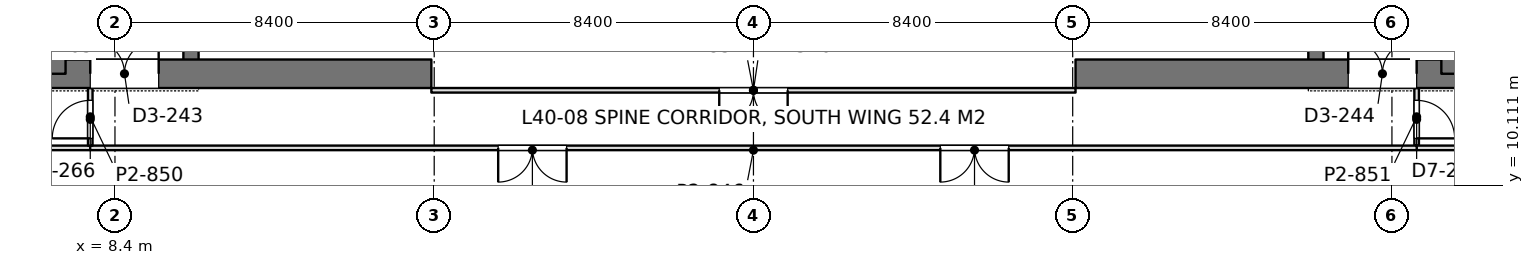
"""IFC4 building model, lengths in metres.
Left out: names, types, materials, properties, quantities, classifications, styles, units other than length and angle.
Written with IfcOpenShell. Run it as: python <this file> out.ifc"""

import sys

from ifc_helpers import new_model, si_unit, direction, frame, frame_2d, origin, place, context, subcontext, project, spatial, rectangle, extrude, element, fill, save


model = new_model("IFC4")
c1 = context("Model", 3, precision=1e-05, world=origin(), true_north=direction((0.0, 1.0)))
c2 = subcontext(c1, "Body", "Model", "MODEL_VIEW")
j1 = project(units=[si_unit("LENGTHUNIT", "METRE"), si_unit("PLANEANGLEUNIT", "RADIAN")], contexts=[c1])
p1 = place(None, origin())
s1 = spatial("IfcSite", under=j1, at=p1, CompositionType="ELEMENT")
p2 = place(p1, origin())
s2 = spatial("IfcBuilding", under=s1, at=p2, CompositionType="ELEMENT")
p3 = place(p2, frame((0.0, 0.0, 177.6)))
s3 = spatial("IfcBuildingStorey", under=s2, at=p3, CompositionType="ELEMENT", Elevation=177.6)
p4 = place(p3, frame((-1.125, 13.05, 0.0), z_axis=(0.0, 0.0, 1.0), x_axis=(1.0, 0.0, 0.0)))
e1 = element("IfcWall", 1, at=p4, inside=s3, PredefinedType="SHEAR", context=c2, shape_type="SweptSolid", body=[
    extrude(rectangle(XDim=17.85, YDim=0.75, at=frame_2d((8.925, 0.0))), origin(), (0.0, 0.0, 1.0), 4.2),
])
p5 = place(p4, frame((8.875, 0.0, 0.0)))
e2 = element("IfcOpeningElement", 2, at=p5, cuts=e1, PredefinedType="OPENING", context=c2, shape_type="SweptSolid", body=[
    extrude(rectangle(XDim=1.8, YDim=2.4, at=frame_2d((0.9, 1.2))), frame((0.0, 0.385, 0.0), z_axis=(0.0, -1.0, 0.0), x_axis=(1.0, 0.0, 0.0)), (0.0, 0.0, 1.0), 0.77),
])
p6 = place(p3, frame((6.9, 13.05, 0.0), z_axis=(0.0, 0.0, 1.0), x_axis=(0.0, 1.0, 0.0)))
e3 = element("IfcWall", 3, at=p6, inside=s3, PredefinedType="SHEAR", context=c2, shape_type="SweptSolid", body=[
    extrude(rectangle(XDim=24.3, YDim=0.4, at=frame_2d((12.15, 0.0))), origin(), (0.0, 0.0, 1.0), 4.2),
])
p7 = place(p6, frame((1.3, 0.0, 0.0)))
e4 = element("IfcOpeningElement", 4, at=p7, cuts=e3, PredefinedType="OPENING", context=c2, shape_type="SweptSolid", body=[
    extrude(rectangle(XDim=1.0, YDim=2.2, at=frame_2d((0.5, 1.1))), frame((0.0, 0.21, 0.0), z_axis=(0.0, -1.0, 0.0), x_axis=(1.0, 0.0, 0.0)), (0.0, 0.0, 1.0), 0.42),
])
p8 = place(p6, frame((22.0, 0.0, 0.0)))
e5 = element("IfcOpeningElement", 5, at=p8, cuts=e3, PredefinedType="OPENING", context=c2, shape_type="SweptSolid", body=[
    extrude(rectangle(XDim=1.0, YDim=2.2, at=frame_2d((0.5, 1.1))), frame((0.0, 0.21, 0.0), z_axis=(0.0, -1.0, 0.0), x_axis=(1.0, 0.0, 0.0)), (0.0, 0.0, 1.0), 0.42),
])
p9 = place(p6, frame((5.55, 0.0, 0.0)))
e6 = element("IfcOpeningElement", 6, at=p9, cuts=e3, PredefinedType="OPENING", context=c2, shape_type="SweptSolid", body=[
    extrude(rectangle(XDim=1.0, YDim=2.2, at=frame_2d((0.5, 1.1))), frame((0.0, 0.21, 0.0), z_axis=(0.0, -1.0, 0.0), x_axis=(1.0, 0.0, 0.0)), (0.0, 0.0, 1.0), 0.42),
])
p10 = place(p6, frame((9.55, 0.0, 0.0)))
e7 = element("IfcOpeningElement", 7, at=p10, cuts=e3, PredefinedType="OPENING", context=c2, shape_type="SweptSolid", body=[
    extrude(rectangle(XDim=1.0, YDim=2.2, at=frame_2d((0.5, 1.1))), frame((0.0, 0.21, 0.0), z_axis=(0.0, -1.0, 0.0), x_axis=(1.0, 0.0, 0.0)), (0.0, 0.0, 1.0), 0.42),
])
p11 = place(p6, frame((12.8, 0.0, 0.0)))
e8 = element("IfcOpeningElement", 8, at=p11, cuts=e3, PredefinedType="OPENING", context=c2, shape_type="SweptSolid", body=[
    extrude(rectangle(XDim=1.1, YDim=2.2, at=frame_2d((0.55, 1.1))), frame((0.0, 0.21, 0.0), z_axis=(0.0, -1.0, 0.0), x_axis=(1.0, 0.0, 0.0)), (0.0, 0.0, 1.0), 0.42),
])
p12 = place(p6, frame((15.538, 0.0, 0.0)))
e9 = element("IfcOpeningElement", 9, at=p12, cuts=e3, PredefinedType="OPENING", context=c2, shape_type="SweptSolid", body=[
    extrude(rectangle(XDim=1.1, YDim=2.2, at=frame_2d((0.55, 1.1))), frame((0.0, 0.21, 0.0), z_axis=(0.0, -1.0, 0.0), x_axis=(1.0, 0.0, 0.0)), (0.0, 0.0, 1.0), 0.42),
])
p13 = place(p6, frame((18.262, 0.0, 0.0)))
e10 = element("IfcOpeningElement", 10, at=p13, cuts=e3, PredefinedType="OPENING", context=c2, shape_type="SweptSolid", body=[
    extrude(rectangle(XDim=1.1, YDim=2.2, at=frame_2d((0.55, 1.1))), frame((0.0, 0.21, 0.0), z_axis=(0.0, -1.0, 0.0), x_axis=(1.0, 0.0, 0.0)), (0.0, 0.0, 1.0), 0.42),
])
p14 = place(p3, frame((10.4, 13.05, 0.0), z_axis=(0.0, 0.0, 1.0), x_axis=(0.0, 1.0, 0.0)))
e11 = element("IfcWall", 11, at=p14, inside=s3, PredefinedType="SHEAR", context=c2, shape_type="SweptSolid", body=[
    extrude(rectangle(XDim=24.3, YDim=0.4, at=frame_2d((12.15, 0.0))), origin(), (0.0, 0.0, 1.0), 4.2),
])
p15 = place(p14, frame((15.75, 0.0, 0.0)))
e12 = element("IfcOpeningElement", 12, at=p15, cuts=e11, PredefinedType="OPENING", context=c2, shape_type="SweptSolid", body=[
    extrude(rectangle(XDim=1.1, YDim=2.2, at=frame_2d((0.55, 1.1))), frame((0.0, 0.21, 0.0), z_axis=(0.0, -1.0, 0.0), x_axis=(1.0, 0.0, 0.0)), (0.0, 0.0, 1.0), 0.42),
])
p16 = place(p14, frame((18.6, 0.0, 0.0)))
e13 = element("IfcOpeningElement", 13, at=p16, cuts=e11, PredefinedType="OPENING", context=c2, shape_type="SweptSolid", body=[
    extrude(rectangle(XDim=1.1, YDim=2.2, at=frame_2d((0.55, 1.1))), frame((0.0, 0.21, 0.0), z_axis=(0.0, -1.0, 0.0), x_axis=(1.0, 0.0, 0.0)), (0.0, 0.0, 1.0), 0.42),
])
p17 = place(p14, frame((21.45, 0.0, 0.0)))
e14 = element("IfcOpeningElement", 14, at=p17, cuts=e11, PredefinedType="OPENING", context=c2, shape_type="SweptSolid", body=[
    extrude(rectangle(XDim=1.1, YDim=2.2, at=frame_2d((0.55, 1.1))), frame((0.0, 0.21, 0.0), z_axis=(0.0, -1.0, 0.0), x_axis=(1.0, 0.0, 0.0)), (0.0, 0.0, 1.0), 0.42),
])
p18 = place(p14, frame((8.65, 0.0, 0.0)))
e15 = element("IfcOpeningElement", 15, at=p18, cuts=e11, PredefinedType="OPENING", context=c2, shape_type="SweptSolid", body=[
    extrude(rectangle(XDim=1.8, YDim=2.4, at=frame_2d((0.9, 1.2))), frame((0.0, 0.21, 0.0), z_axis=(0.0, -1.0, 0.0), x_axis=(1.0, 0.0, 0.0)), (0.0, 0.0, 1.0), 0.42),
])
p19 = place(p3, frame((33.675, 13.05, 0.0), z_axis=(0.0, 0.0, 1.0), x_axis=(1.0, 0.0, 0.0)))
e16 = element("IfcWall", 16, at=p19, inside=s3, PredefinedType="SHEAR", context=c2, shape_type="SweptSolid", body=[
    extrude(rectangle(XDim=17.85, YDim=0.75, at=frame_2d((8.925, 0.0))), origin(), (0.0, 0.0, 1.0), 4.2),
])
p20 = place(p19, frame((7.175, 0.0, 0.0)))
e17 = element("IfcOpeningElement", 17, at=p20, cuts=e16, PredefinedType="OPENING", context=c2, shape_type="SweptSolid", body=[
    extrude(rectangle(XDim=1.8, YDim=2.4, at=frame_2d((0.9, 1.2))), frame((0.0, 0.385, 0.0), z_axis=(0.0, -1.0, 0.0), x_axis=(1.0, 0.0, 0.0)), (0.0, 0.0, 1.0), 0.77),
])
p21 = place(p3, frame((43.5, 13.05, 0.0), z_axis=(0.0, 0.0, 1.0), x_axis=(0.0, 1.0, 0.0)))
e18 = element("IfcWall", 18, at=p21, inside=s3, PredefinedType="SHEAR", context=c2, shape_type="SweptSolid", body=[
    extrude(rectangle(XDim=24.3, YDim=0.4, at=frame_2d((12.15, 0.0))), origin(), (0.0, 0.0, 1.0), 4.2),
])
p22 = place(p21, frame((1.3, 0.0, 0.0)))
e19 = element("IfcOpeningElement", 19, at=p22, cuts=e18, PredefinedType="OPENING", context=c2, shape_type="SweptSolid", body=[
    extrude(rectangle(XDim=1.0, YDim=2.2, at=frame_2d((0.5, 1.1))), frame((0.0, 0.21, 0.0), z_axis=(0.0, -1.0, 0.0), x_axis=(1.0, 0.0, 0.0)), (0.0, 0.0, 1.0), 0.42),
])
p23 = place(p21, frame((22.0, 0.0, 0.0)))
e20 = element("IfcOpeningElement", 20, at=p23, cuts=e18, PredefinedType="OPENING", context=c2, shape_type="SweptSolid", body=[
    extrude(rectangle(XDim=1.0, YDim=2.2, at=frame_2d((0.5, 1.1))), frame((0.0, 0.21, 0.0), z_axis=(0.0, -1.0, 0.0), x_axis=(1.0, 0.0, 0.0)), (0.0, 0.0, 1.0), 0.42),
])
p24 = place(p21, frame((5.55, 0.0, 0.0)))
e21 = element("IfcOpeningElement", 21, at=p24, cuts=e18, PredefinedType="OPENING", context=c2, shape_type="SweptSolid", body=[
    extrude(rectangle(XDim=1.0, YDim=2.2, at=frame_2d((0.5, 1.1))), frame((0.0, 0.21, 0.0), z_axis=(0.0, -1.0, 0.0), x_axis=(1.0, 0.0, 0.0)), (0.0, 0.0, 1.0), 0.42),
])
p25 = place(p21, frame((9.55, 0.0, 0.0)))
e22 = element("IfcOpeningElement", 22, at=p25, cuts=e18, PredefinedType="OPENING", context=c2, shape_type="SweptSolid", body=[
    extrude(rectangle(XDim=1.0, YDim=2.2, at=frame_2d((0.5, 1.1))), frame((0.0, 0.21, 0.0), z_axis=(0.0, -1.0, 0.0), x_axis=(1.0, 0.0, 0.0)), (0.0, 0.0, 1.0), 0.42),
])
p26 = place(p21, frame((12.8, 0.0, 0.0)))
e23 = element("IfcOpeningElement", 23, at=p26, cuts=e18, PredefinedType="OPENING", context=c2, shape_type="SweptSolid", body=[
    extrude(rectangle(XDim=1.1, YDim=2.2, at=frame_2d((0.55, 1.1))), frame((0.0, 0.21, 0.0), z_axis=(0.0, -1.0, 0.0), x_axis=(1.0, 0.0, 0.0)), (0.0, 0.0, 1.0), 0.42),
])
p27 = place(p21, frame((15.538, 0.0, 0.0)))
e24 = element("IfcOpeningElement", 24, at=p27, cuts=e18, PredefinedType="OPENING", context=c2, shape_type="SweptSolid", body=[
    extrude(rectangle(XDim=1.1, YDim=2.2, at=frame_2d((0.55, 1.1))), frame((0.0, 0.21, 0.0), z_axis=(0.0, -1.0, 0.0), x_axis=(1.0, 0.0, 0.0)), (0.0, 0.0, 1.0), 0.42),
])
p28 = place(p21, frame((18.262, 0.0, 0.0)))
e25 = element("IfcOpeningElement", 25, at=p28, cuts=e18, PredefinedType="OPENING", context=c2, shape_type="SweptSolid", body=[
    extrude(rectangle(XDim=1.1, YDim=2.2, at=frame_2d((0.55, 1.1))), frame((0.0, 0.21, 0.0), z_axis=(0.0, -1.0, 0.0), x_axis=(1.0, 0.0, 0.0)), (0.0, 0.0, 1.0), 0.42),
])
p29 = place(p3, frame((40.0, 13.05, 0.0), z_axis=(0.0, 0.0, 1.0), x_axis=(0.0, 1.0, 0.0)))
e26 = element("IfcWall", 26, at=p29, inside=s3, PredefinedType="SHEAR", context=c2, shape_type="SweptSolid", body=[
    extrude(rectangle(XDim=24.3, YDim=0.4, at=frame_2d((12.15, 0.0))), origin(), (0.0, 0.0, 1.0), 4.2),
])
p30 = place(p29, frame((15.75, 0.0, 0.0)))
e27 = element("IfcOpeningElement", 27, at=p30, cuts=e26, PredefinedType="OPENING", context=c2, shape_type="SweptSolid", body=[
    extrude(rectangle(XDim=1.1, YDim=2.2, at=frame_2d((0.55, 1.1))), frame((0.0, 0.21, 0.0), z_axis=(0.0, -1.0, 0.0), x_axis=(1.0, 0.0, 0.0)), (0.0, 0.0, 1.0), 0.42),
])
p31 = place(p29, frame((18.6, 0.0, 0.0)))
e28 = element("IfcOpeningElement", 28, at=p31, cuts=e26, PredefinedType="OPENING", context=c2, shape_type="SweptSolid", body=[
    extrude(rectangle(XDim=1.1, YDim=2.2, at=frame_2d((0.55, 1.1))), frame((0.0, 0.21, 0.0), z_axis=(0.0, -1.0, 0.0), x_axis=(1.0, 0.0, 0.0)), (0.0, 0.0, 1.0), 0.42),
])
p32 = place(p29, frame((21.45, 0.0, 0.0)))
e29 = element("IfcOpeningElement", 29, at=p32, cuts=e26, PredefinedType="OPENING", context=c2, shape_type="SweptSolid", body=[
    extrude(rectangle(XDim=1.1, YDim=2.2, at=frame_2d((0.55, 1.1))), frame((0.0, 0.21, 0.0), z_axis=(0.0, -1.0, 0.0), x_axis=(1.0, 0.0, 0.0)), (0.0, 0.0, 1.0), 0.42),
])
p33 = place(p29, frame((8.65, 0.0, 0.0)))
e30 = element("IfcOpeningElement", 30, at=p33, cuts=e26, PredefinedType="OPENING", context=c2, shape_type="SweptSolid", body=[
    extrude(rectangle(XDim=1.8, YDim=2.4, at=frame_2d((0.9, 1.2))), frame((0.0, 0.21, 0.0), z_axis=(0.0, -1.0, 0.0), x_axis=(1.0, 0.0, 0.0)), (0.0, 0.0, 1.0), 0.42),
])
p34 = place(p3, frame((7.748, 11.1, 0.0), z_axis=(0.0, 0.0, 1.0), x_axis=(1.0, 0.0, 0.0)))
e31 = element("IfcWall", 31, at=p34, inside=s3, PredefinedType="PARTITIONING", context=c2, shape_type="SweptSolid", body=[
    extrude(rectangle(XDim=34.904, YDim=0.12, at=frame_2d((17.452, 0.0))), origin(), (0.0, 0.0, 1.0), 3.55),
])
p35 = place(p34, frame((10.735, 0.0, 0.0)))
e32 = element("IfcOpeningElement", 32, at=p35, cuts=e31, PredefinedType="OPENING", context=c2, shape_type="SweptSolid", body=[
    extrude(rectangle(XDim=1.8, YDim=2.2, at=frame_2d((0.9, 1.1))), frame((0.0, 0.07, 0.0), z_axis=(0.0, -1.0, 0.0), x_axis=(1.0, 0.0, 0.0)), (0.0, 0.0, 1.0), 0.14),
])
p36 = place(p34, frame((22.369, 0.0, 0.0)))
e33 = element("IfcOpeningElement", 33, at=p36, cuts=e31, PredefinedType="OPENING", context=c2, shape_type="SweptSolid", body=[
    extrude(rectangle(XDim=1.8, YDim=2.2, at=frame_2d((0.9, 1.1))), frame((0.0, 0.07, 0.0), z_axis=(0.0, -1.0, 0.0), x_axis=(1.0, 0.0, 0.0)), (0.0, 0.0, 1.0), 0.14),
])
p37 = place(p3, frame((7.75, 11.158, 0.0), z_axis=(0.0, 0.0, 1.0), x_axis=(0.0, 1.0, 0.0)))
e34 = element("IfcWall", 34, at=p37, inside=s3, PredefinedType="PARTITIONING", context=c2, shape_type="SweptSolid", body=[
    extrude(rectangle(XDim=1.518, YDim=0.12, at=frame_2d((0.759, 0.0))), origin(), (0.0, 0.0, 1.0), 4.05),
])
p38 = place(p37, frame((0.192, 0.0, 0.0)))
e35 = element("IfcOpeningElement", 35, at=p38, cuts=e34, PredefinedType="OPENING", context=c2, shape_type="SweptSolid", body=[
    extrude(rectangle(XDim=1.0, YDim=2.4, at=frame_2d((0.5, 1.2))), frame((0.0, 0.07, 0.0), z_axis=(0.0, -1.0, 0.0), x_axis=(1.0, 0.0, 0.0)), (0.0, 0.0, 1.0), 0.14),
])
p39 = place(p3, frame((42.65, 11.158, 0.0), z_axis=(0.0, 0.0, 1.0), x_axis=(0.0, 1.0, 0.0)))
e36 = element("IfcWall", 36, at=p39, inside=s3, PredefinedType="PARTITIONING", context=c2, shape_type="SweptSolid", body=[
    extrude(rectangle(XDim=1.518, YDim=0.12, at=frame_2d((0.759, 0.0))), origin(), (0.0, 0.0, 1.0), 4.05),
])
p40 = place(p39, frame((0.192, 0.0, 0.0)))
e37 = element("IfcOpeningElement", 37, at=p40, cuts=e36, PredefinedType="OPENING", context=c2, shape_type="SweptSolid", body=[
    extrude(rectangle(XDim=1.0, YDim=2.4, at=frame_2d((0.5, 1.2))), frame((0.0, 0.07, 0.0), z_axis=(0.0, -1.0, 0.0), x_axis=(1.0, 0.0, 0.0)), (0.0, 0.0, 1.0), 0.14),
])
for number, where, z_axis, x_axis in (
    (38, (1.2, 11.1, 0.0), (0.0, 0.0, 1.0), (1.0, 0.0, 0.0)),
    (39, (42.648, 11.1, 0.0), (0.0, 0.0, 1.0), (1.0, 0.0, 0.0)),
):
    element("IfcWall", number, at=place(p3, frame(where, z_axis=z_axis, x_axis=x_axis)), inside=s3, PredefinedType="PARTITIONING", context=c2, shape_type="SweptSolid", body=[
        extrude(rectangle(XDim=6.552, YDim=0.12, at=frame_2d((3.276, 0.0))), origin(), (0.0, 0.0, 1.0), 4.05),
    ])
p41 = place(p3, frame((16.725, 12.615, 0.0), z_axis=(0.0, 0.0, 1.0), x_axis=(1.0, 0.0, 0.0)))
e40 = element("IfcWall", 40, at=p41, inside=s3, PredefinedType="PARTITIONING", context=c2, shape_type="SweptSolid", body=[
    extrude(rectangle(XDim=16.95, YDim=0.12, at=frame_2d((8.475, 0.0))), origin(), (0.0, 0.0, 1.0), 3.55),
])
p42 = place(p41, frame((7.575, 0.0, 0.0)))
e41 = element("IfcOpeningElement", 41, at=p42, cuts=e40, PredefinedType="OPENING", context=c2, shape_type="SweptSolid", body=[
    extrude(rectangle(XDim=1.8, YDim=2.2, at=frame_2d((0.9, 1.1))), frame((0.0, 0.07, 0.0), z_axis=(0.0, -1.0, 0.0), x_axis=(1.0, 0.0, 0.0)), (0.0, 0.0, 1.0), 0.14),
])
p43 = place(p5, origin())
e42 = element("IfcDoor", 42, at=p43, inside=s3, OperationType="DOUBLE_DOOR_SINGLE_SWING", PredefinedType="DOOR", context=c2, shape_type="SweptSolid", body=[
    extrude(rectangle(XDim=1.8, YDim=2.4, at=frame_2d((0.9, 1.2))), frame((0.0, 0.025, 0.0), z_axis=(0.0, -1.0, 0.0), x_axis=(1.0, 0.0, 0.0)), (0.0, 0.0, 1.0), 0.05),
])
fill(e2, e42)
p44 = place(p20, origin())
e43 = element("IfcDoor", 43, at=p44, inside=s3, OperationType="DOUBLE_DOOR_SINGLE_SWING", PredefinedType="DOOR", context=c2, shape_type="SweptSolid", body=[
    extrude(rectangle(XDim=1.8, YDim=2.4, at=frame_2d((0.9, 1.2))), frame((0.0, 0.025, 0.0), z_axis=(0.0, -1.0, 0.0), x_axis=(1.0, 0.0, 0.0)), (0.0, 0.0, 1.0), 0.05),
])
fill(e17, e43)
p45 = place(p35, frame((1.8, 0.0, 0.0), z_axis=(0.0, 0.0, 1.0), x_axis=(-1.0, 0.0, 0.0)))
e44 = element("IfcDoor", 44, at=p45, inside=s3, OperationType="DOUBLE_DOOR_SINGLE_SWING", PredefinedType="DOOR", context=c2, shape_type="SweptSolid", body=[
    extrude(rectangle(XDim=1.8, YDim=2.2, at=frame_2d((0.9, 1.1))), frame((0.0, 0.025, 0.0), z_axis=(0.0, -1.0, 0.0), x_axis=(1.0, 0.0, 0.0)), (0.0, 0.0, 1.0), 0.05),
])
fill(e32, e44)
p46 = place(p36, frame((1.8, 0.0, 0.0), z_axis=(0.0, 0.0, 1.0), x_axis=(-1.0, 0.0, 0.0)))
e45 = element("IfcDoor", 45, at=p46, inside=s3, OperationType="DOUBLE_DOOR_SINGLE_SWING", PredefinedType="DOOR", context=c2, shape_type="SweptSolid", body=[
    extrude(rectangle(XDim=1.8, YDim=2.2, at=frame_2d((0.9, 1.1))), frame((0.0, 0.025, 0.0), z_axis=(0.0, -1.0, 0.0), x_axis=(1.0, 0.0, 0.0)), (0.0, 0.0, 1.0), 0.05),
])
fill(e33, e45)
p47 = place(p38, origin())
e46 = element("IfcDoor", 46, at=p47, inside=s3, OperationType="SINGLE_SWING_LEFT", PredefinedType="DOOR", context=c2, shape_type="SweptSolid", body=[
    extrude(rectangle(XDim=1.0, YDim=2.4, at=frame_2d((0.5, 1.2))), frame((0.0, 0.025, 0.0), z_axis=(0.0, -1.0, 0.0), x_axis=(1.0, 0.0, 0.0)), (0.0, 0.0, 1.0), 0.05),
])
fill(e35, e46)
p48 = place(p40, frame((1.0, 0.0, 0.0), z_axis=(0.0, 0.0, 1.0), x_axis=(-1.0, 0.0, 0.0)))
e47 = element("IfcDoor", 47, at=p48, inside=s3, OperationType="SINGLE_SWING_RIGHT", PredefinedType="DOOR", context=c2, shape_type="SweptSolid", body=[
    extrude(rectangle(XDim=1.0, YDim=2.4, at=frame_2d((0.5, 1.2))), frame((0.0, 0.025, 0.0), z_axis=(0.0, -1.0, 0.0), x_axis=(1.0, 0.0, 0.0)), (0.0, 0.0, 1.0), 0.05),
])
fill(e37, e47)
p49 = place(p42, frame((1.8, 0.0, 0.0), z_axis=(0.0, 0.0, 1.0), x_axis=(-1.0, 0.0, 0.0)))
e48 = element("IfcDoor", 48, at=p49, inside=s3, OperationType="DOUBLE_DOOR_SINGLE_SWING", PredefinedType="DOOR", context=c2, shape_type="SweptSolid", body=[
    extrude(rectangle(XDim=1.8, YDim=2.2, at=frame_2d((0.9, 1.1))), frame((0.0, 0.025, 0.0), z_axis=(0.0, -1.0, 0.0), x_axis=(1.0, 0.0, 0.0)), (0.0, 0.0, 1.0), 0.05),
])
fill(e41, e48)
save(model, sys.argv[1])
